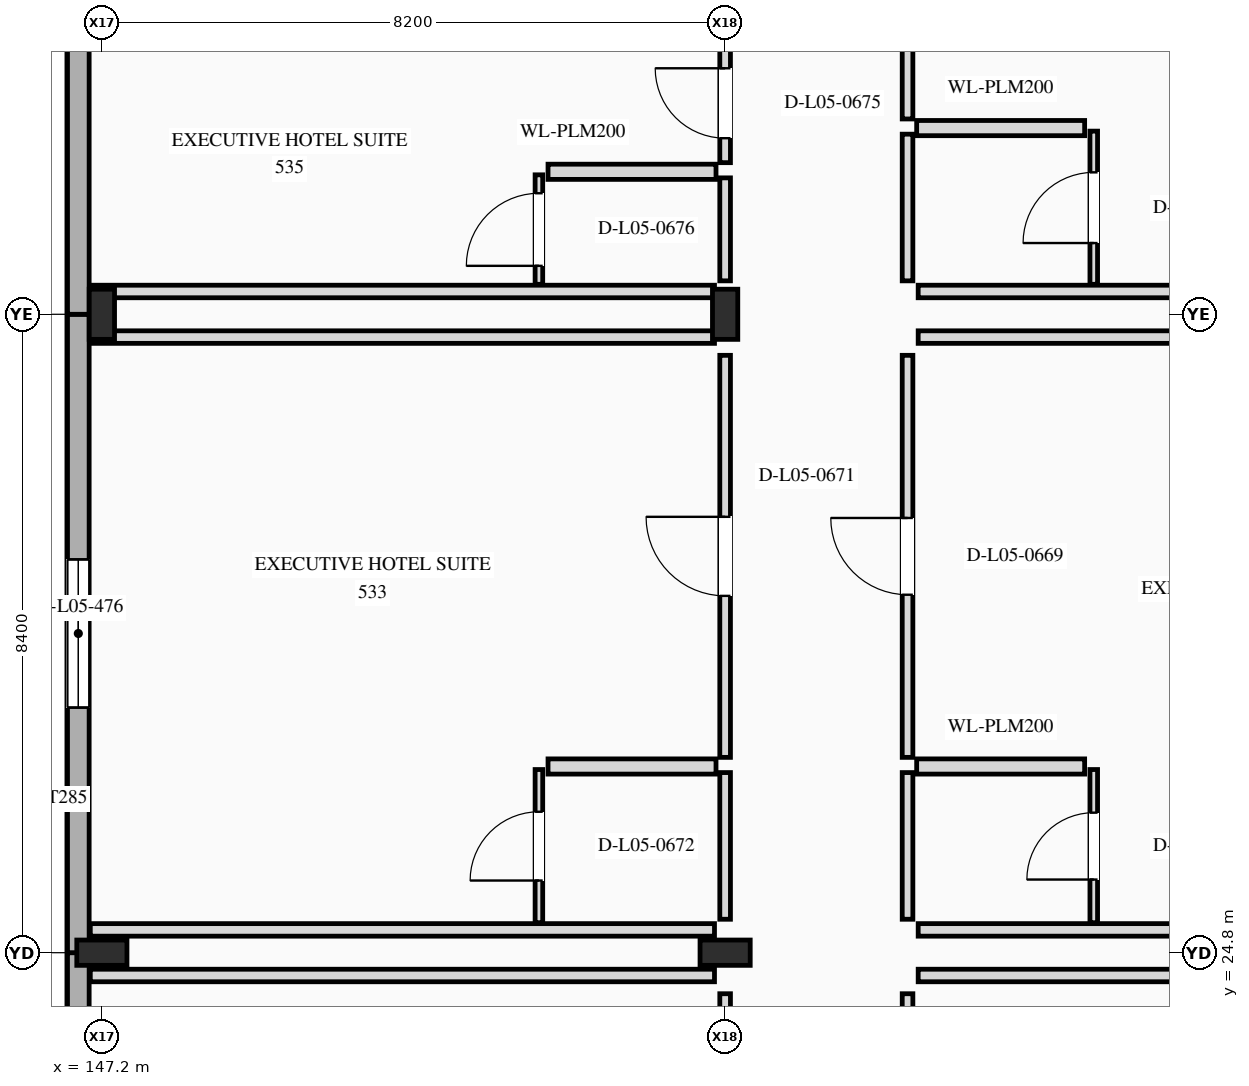
"""IFC4 building model, lengths in metres.
Left out: names, types, materials, properties, quantities, classifications, styles, units other than length and angle.
Written with IfcOpenShell. Run it as: python <this file> out.ifc"""

import sys

from ifc_helpers import new_model, si_unit, direction, frame, frame_2d, origin, origin_2d, place, context, subcontext, project, spatial, rectangle, i_section, extrude, element, fill, save


model = new_model("IFC4")
c1 = context("Model", 3, precision=1e-05, world=origin(), true_north=direction((0.0, 1.0)))
c2 = subcontext(c1, "Body", "Model", "MODEL_VIEW")
j1 = project(units=[si_unit("LENGTHUNIT", "METRE"), si_unit("PLANEANGLEUNIT", "RADIAN")], contexts=[c1])
p1 = place(None, origin())
s1 = spatial("IfcSite", under=j1, at=p1, CompositionType="ELEMENT")
p2 = place(p1, origin())
s2 = spatial("IfcBuilding", under=s1, at=p2, CompositionType="ELEMENT")
p3 = place(p2, frame((0.0, 0.0, 23.4)))
s3 = spatial("IfcBuildingStorey", under=s2, at=p3, CompositionType="ELEMENT", Elevation=23.4)
for number, where, z_axis, x_axis in (
    (1, (147.2, 24.8, 0.0), (0.0, 0.0, 1.0), (0.0, 1.0, 0.0)),
    (2, (147.2, 33.2, 0.0), (0.0, 0.0, 1.0), (1.0, 0.0, 0.0)),
    (3, (155.4, 24.8, 0.0), (0.0, 0.0, 1.0), (0.0, 1.0, 0.0)),
    (4, (155.4, 33.2, 0.0), (0.0, 0.0, 1.0), (1.0, 0.0, 0.0)),
):
    element("IfcColumn", number, at=place(p3, frame(where, z_axis=z_axis, x_axis=x_axis)), inside=s3, PredefinedType="COLUMN", context=c2, shape_type="SweptSolid", body=[
        extrude(i_section(OverallWidth=0.333, OverallDepth=0.66, WebThickness=0.024, FlangeThickness=0.044, at=origin_2d()), origin(), (0.0, 0.0, 1.0), 3.6),
    ])
p4 = place(p3, frame((146.89, 19.254, 0.0), z_axis=(0.0, 0.0, 1.0), x_axis=(0.0, 1.0, 0.0)))
e5 = element("IfcWall", 5, at=p4, inside=s3, PredefinedType="STANDARD", context=c2, shape_type="SweptSolid", body=[
    extrude(rectangle(XDim=5.546, YDim=0.285, at=frame_2d((2.773, 0.0))), origin(), (0.0, 0.0, 1.0), 3.6),
])
p5 = place(p4, frame((1.698, 0.0, 0.85)))
e6 = element("IfcOpeningElement", 6, at=p5, cuts=e5, PredefinedType="OPENING", context=c2, shape_type="SweptSolid", body=[
    extrude(rectangle(XDim=1.8, YDim=1.8, at=frame_2d((0.9, 0.9))), frame((0.0, 0.152, 0.0), z_axis=(0.0, -1.0, 0.0), x_axis=(1.0, 0.0, 0.0)), (0.0, 0.0, 1.0), 0.305),
])
p6 = place(p3, frame((146.89, 24.8, 0.0), z_axis=(0.0, 0.0, 1.0), x_axis=(0.0, 1.0, 0.0)))
e7 = element("IfcWall", 7, at=p6, inside=s3, PredefinedType="STANDARD", context=c2, shape_type="SweptSolid", body=[
    extrude(rectangle(XDim=8.4, YDim=0.285, at=frame_2d((4.2, 0.0))), origin(), (0.0, 0.0, 1.0), 3.6),
])
p7 = place(p6, frame((3.225, 0.0, 0.85)))
e8 = element("IfcOpeningElement", 8, at=p7, cuts=e7, PredefinedType="OPENING", context=c2, shape_type="SweptSolid", body=[
    extrude(rectangle(XDim=1.95, YDim=1.85, at=frame_2d((0.975, 0.925))), frame((0.0, 0.152, 0.0), z_axis=(0.0, -1.0, 0.0), x_axis=(1.0, 0.0, 0.0)), (0.0, 0.0, 1.0), 0.305),
])
p8 = place(p3, frame((146.89, 33.2, 0.0), z_axis=(0.0, 0.0, 1.0), x_axis=(0.0, 1.0, 0.0)))
e9 = element("IfcWall", 9, at=p8, inside=s3, PredefinedType="STANDARD", context=c2, shape_type="SweptSolid", body=[
    extrude(rectangle(XDim=8.4, YDim=0.285, at=frame_2d((4.2, 0.0))), origin(), (0.0, 0.0, 1.0), 3.6),
])
p9 = place(p3, frame((157.8, 21.37, 0.0), z_axis=(0.0, 0.0, 1.0), x_axis=(0.0, 1.0, 0.0)))
e10 = element("IfcWall", 10, at=p9, inside=s3, PredefinedType="PARTITIONING", context=c2, shape_type="SweptSolid", body=[
    extrude(rectangle(XDim=2.89, YDim=0.14, at=frame_2d((1.445, 0.0))), origin(), (0.0, 0.0, 1.0), 2.858),
])
p10 = place(p9, frame((0.97, 0.0, 0.0)))
e11 = element("IfcOpeningElement", 11, at=p10, cuts=e10, PredefinedType="OPENING", context=c2, shape_type="SweptSolid", body=[
    extrude(rectangle(XDim=0.95, YDim=2.15, at=frame_2d((0.475, 1.075))), frame((0.0, 0.08, 0.0), z_axis=(0.0, -1.0, 0.0), x_axis=(1.0, 0.0, 0.0)), (0.0, 0.0, 1.0), 0.16),
])
p11 = place(p3, frame((157.94, 24.5, 0.0), z_axis=(0.0, 0.0, 1.0), x_axis=(1.0, 0.0, 0.0)))
e12 = element("IfcWall", 12, at=p11, inside=s3, PredefinedType="PARTITIONING", context=c2, shape_type="SweptSolid", body=[
    extrude(rectangle(XDim=8.213, YDim=0.165, at=frame_2d((4.106, 0.0))), origin(), (0.0, 0.0, 1.0), 2.69),
])
p12 = place(p3, frame((155.4, 21.37, 0.0), z_axis=(0.0, 0.0, 1.0), x_axis=(0.0, 1.0, 0.0)))
e13 = element("IfcWall", 13, at=p12, inside=s3, PredefinedType="PARTITIONING", context=c2, shape_type="SweptSolid", body=[
    extrude(rectangle(XDim=2.89, YDim=0.14, at=frame_2d((1.445, 0.0))), origin(), (0.0, 0.0, 1.0), 2.774),
])
p13 = place(p12, frame((0.955, 0.0, 0.0)))
e14 = element("IfcOpeningElement", 14, at=p13, cuts=e13, PredefinedType="OPENING", context=c2, shape_type="SweptSolid", body=[
    extrude(rectangle(XDim=0.98, YDim=2.2, at=frame_2d((0.49, 1.1))), frame((0.0, 0.08, 0.0), z_axis=(0.0, -1.0, 0.0), x_axis=(1.0, 0.0, 0.0)), (0.0, 0.0, 1.0), 0.16),
])
p14 = place(p3, frame((147.048, 24.5, 0.0), z_axis=(0.0, 0.0, 1.0), x_axis=(1.0, 0.0, 0.0)))
e15 = element("IfcWall", 15, at=p14, inside=s3, PredefinedType="PARTITIONING", context=c2, shape_type="SweptSolid", body=[
    extrude(rectangle(XDim=8.212, YDim=0.165, at=frame_2d((4.106, 0.0))), origin(), (0.0, 0.0, 1.0), 2.713),
])
p15 = place(p3, frame((157.8, 25.24, 0.0), z_axis=(0.0, 0.0, 1.0), x_axis=(0.0, 1.0, 0.0)))
e16 = element("IfcWall", 16, at=p15, inside=s3, PredefinedType="PARTITIONING", context=c2, shape_type="SweptSolid", body=[
    extrude(rectangle(XDim=1.93, YDim=0.14, at=frame_2d((0.965, 0.0))), origin(), (0.0, 0.0, 1.0), 2.853),
])
p16 = place(p3, frame((157.8, 27.37, 0.0), z_axis=(0.0, 0.0, 1.0), x_axis=(0.0, 1.0, 0.0)))
e17 = element("IfcWall", 17, at=p16, inside=s3, PredefinedType="PARTITIONING", context=c2, shape_type="SweptSolid", body=[
    extrude(rectangle(XDim=5.29, YDim=0.14, at=frame_2d((2.645, 0.0))), origin(), (0.0, 0.0, 1.0), 2.853),
])
p17 = place(p16, frame((2.14, 0.0, 0.0)))
e18 = element("IfcOpeningElement", 18, at=p17, cuts=e17, PredefinedType="OPENING", context=c2, shape_type="SweptSolid", body=[
    extrude(rectangle(XDim=1.01, YDim=2.2, at=frame_2d((0.505, 1.1))), frame((0.0, 0.08, 0.0), z_axis=(0.0, -1.0, 0.0), x_axis=(1.0, 0.0, 0.0)), (0.0, 0.0, 1.0), 0.16),
])
for number, where, z_axis, x_axis in (
    (19, (157.94, 25.1, 0.0), (0.0, 0.0, 1.0), (1.0, 0.0, 0.0)),
    (20, (157.94, 32.9, 0.0), (0.0, 0.0, 1.0), (1.0, 0.0, 0.0)),
):
    element("IfcWall", number, at=place(p3, frame(where, z_axis=z_axis, x_axis=x_axis)), inside=s3, PredefinedType="PARTITIONING", context=c2, shape_type="SweptSolid", body=[
        extrude(rectangle(XDim=8.213, YDim=0.165, at=frame_2d((4.106, 0.0))), origin(), (0.0, 0.0, 1.0), 2.69),
    ])
p18 = place(p3, frame((157.92, 27.25, 0.0), z_axis=(0.0, 0.0, 1.0), x_axis=(1.0, 0.0, 0.0)))
e21 = element("IfcWall", 21, at=p18, inside=s3, PredefinedType="PLUMBINGWALL", context=c2, shape_type="SweptSolid", body=[
    extrude(rectangle(XDim=2.21, YDim=0.2, at=frame_2d((1.105, 0.0))), origin(), (0.0, 0.0, 1.0), 3.3),
])
p19 = place(p3, frame((160.25, 25.195, 0.0), z_axis=(0.0, 0.0, 1.0), x_axis=(0.0, 1.0, 0.0)))
e22 = element("IfcWall", 22, at=p19, inside=s3, PredefinedType="PARTITIONING", context=c2, shape_type="SweptSolid", body=[
    extrude(rectangle(XDim=2.015, YDim=0.1, at=frame_2d((1.008, 0.0))), origin(), (0.0, 0.0, 1.0), 2.853),
])
p20 = place(p19, frame((0.568, 0.0, 0.0)))
e23 = element("IfcOpeningElement", 23, at=p20, cuts=e22, PredefinedType="OPENING", context=c2, shape_type="SweptSolid", body=[
    extrude(rectangle(XDim=0.88, YDim=2.18, at=frame_2d((0.44, 1.09))), frame((0.0, 0.06, 0.0), z_axis=(0.0, -1.0, 0.0), x_axis=(1.0, 0.0, 0.0)), (0.0, 0.0, 1.0), 0.12),
])
p21 = place(p3, frame((155.4, 25.24, 0.0), z_axis=(0.0, 0.0, 1.0), x_axis=(0.0, 1.0, 0.0)))
e24 = element("IfcWall", 24, at=p21, inside=s3, PredefinedType="PARTITIONING", context=c2, shape_type="SweptSolid", body=[
    extrude(rectangle(XDim=1.93, YDim=0.14, at=frame_2d((0.965, 0.0))), origin(), (0.0, 0.0, 1.0), 2.774),
])
p22 = place(p3, frame((155.4, 27.37, 0.0), z_axis=(0.0, 0.0, 1.0), x_axis=(0.0, 1.0, 0.0)))
e25 = element("IfcWall", 25, at=p22, inside=s3, PredefinedType="PARTITIONING", context=c2, shape_type="SweptSolid", body=[
    extrude(rectangle(XDim=5.29, YDim=0.14, at=frame_2d((2.645, 0.0))), origin(), (0.0, 0.0, 1.0), 2.774),
])
p23 = place(p22, frame((2.125, 0.0, 0.0)))
e26 = element("IfcOpeningElement", 26, at=p23, cuts=e25, PredefinedType="OPENING", context=c2, shape_type="SweptSolid", body=[
    extrude(rectangle(XDim=1.04, YDim=2.25, at=frame_2d((0.52, 1.125))), frame((0.0, 0.08, 0.0), z_axis=(0.0, -1.0, 0.0), x_axis=(1.0, 0.0, 0.0)), (0.0, 0.0, 1.0), 0.16),
])
for number, where, z_axis, x_axis in (
    (27, (147.048, 25.1, 0.0), (0.0, 0.0, 1.0), (1.0, 0.0, 0.0)),
    (28, (147.048, 32.9, 0.0), (0.0, 0.0, 1.0), (1.0, 0.0, 0.0)),
):
    element("IfcWall", number, at=place(p3, frame(where, z_axis=z_axis, x_axis=x_axis)), inside=s3, PredefinedType="PARTITIONING", context=c2, shape_type="SweptSolid", body=[
        extrude(rectangle(XDim=8.212, YDim=0.165, at=frame_2d((4.106, 0.0))), origin(), (0.0, 0.0, 1.0), 2.713),
    ])
p24 = place(p3, frame((153.07, 27.25, 0.0), z_axis=(0.0, 0.0, 1.0), x_axis=(1.0, 0.0, 0.0)))
e29 = element("IfcWall", 29, at=p24, inside=s3, PredefinedType="PLUMBINGWALL", context=c2, shape_type="SweptSolid", body=[
    extrude(rectangle(XDim=2.21, YDim=0.2, at=frame_2d((1.105, 0.0))), origin(), (0.0, 0.0, 1.0), 3.3),
])
p25 = place(p3, frame((152.95, 25.195, 0.0), z_axis=(0.0, 0.0, 1.0), x_axis=(0.0, 1.0, 0.0)))
e30 = element("IfcWall", 30, at=p25, inside=s3, PredefinedType="PARTITIONING", context=c2, shape_type="SweptSolid", body=[
    extrude(rectangle(XDim=2.015, YDim=0.1, at=frame_2d((1.008, 0.0))), origin(), (0.0, 0.0, 1.0), 2.908),
])
p26 = place(p25, frame((0.555, 0.0, 0.0)))
e31 = element("IfcOpeningElement", 31, at=p26, cuts=e30, PredefinedType="OPENING", context=c2, shape_type="SweptSolid", body=[
    extrude(rectangle(XDim=0.905, YDim=2.18, at=frame_2d((0.453, 1.09))), frame((0.0, 0.06, 0.0), z_axis=(0.0, -1.0, 0.0), x_axis=(1.0, 0.0, 0.0)), (0.0, 0.0, 1.0), 0.12),
])
p27 = place(p3, frame((157.8, 33.64, 0.0), z_axis=(0.0, 0.0, 1.0), x_axis=(0.0, 1.0, 0.0)))
e32 = element("IfcWall", 32, at=p27, inside=s3, PredefinedType="PARTITIONING", context=c2, shape_type="SweptSolid", body=[
    extrude(rectangle(XDim=1.93, YDim=0.14, at=frame_2d((0.965, 0.0))), origin(), (0.0, 0.0, 1.0), 3.3),
])
p28 = place(p3, frame((157.8, 35.77, 0.0), z_axis=(0.0, 0.0, 1.0), x_axis=(0.0, 1.0, 0.0)))
e33 = element("IfcWall", 33, at=p28, inside=s3, PredefinedType="PARTITIONING", context=c2, shape_type="SweptSolid", body=[
    extrude(rectangle(XDim=5.29, YDim=0.14, at=frame_2d((2.645, 0.0))), origin(), (0.0, 0.0, 1.0), 3.3),
])
p29 = place(p28, frame((2.11, 0.0, 0.0)))
e34 = element("IfcOpeningElement", 34, at=p29, cuts=e33, PredefinedType="OPENING", context=c2, shape_type="SweptSolid", body=[
    extrude(rectangle(XDim=1.07, YDim=2.25, at=frame_2d((0.535, 1.125))), frame((0.0, 0.08, 0.0), z_axis=(0.0, -1.0, 0.0), x_axis=(1.0, 0.0, 0.0)), (0.0, 0.0, 1.0), 0.16),
])
p30 = place(p3, frame((157.94, 33.5, 0.0), z_axis=(0.0, 0.0, 1.0), x_axis=(1.0, 0.0, 0.0)))
e35 = element("IfcWall", 35, at=p30, inside=s3, PredefinedType="PARTITIONING", context=c2, shape_type="SweptSolid", body=[
    extrude(rectangle(XDim=8.213, YDim=0.165, at=frame_2d((4.106, 0.0))), origin(), (0.0, 0.0, 1.0), 2.69),
])
p31 = place(p3, frame((157.92, 35.65, 0.0), z_axis=(0.0, 0.0, 1.0), x_axis=(1.0, 0.0, 0.0)))
e36 = element("IfcWall", 36, at=p31, inside=s3, PredefinedType="PLUMBINGWALL", context=c2, shape_type="SweptSolid", body=[
    extrude(rectangle(XDim=2.21, YDim=0.2, at=frame_2d((1.105, 0.0))), origin(), (0.0, 0.0, 1.0), 3.3),
])
p32 = place(p3, frame((160.25, 33.594, 0.0), z_axis=(0.0, 0.0, 1.0), x_axis=(0.0, 1.0, 0.0)))
e37 = element("IfcWall", 37, at=p32, inside=s3, PredefinedType="PARTITIONING", context=c2, shape_type="SweptSolid", body=[
    extrude(rectangle(XDim=2.016, YDim=0.1, at=frame_2d((1.008, 0.0))), origin(), (0.0, 0.0, 1.0), 3.3),
])
p33 = place(p32, frame((0.543, 0.0, 0.0)))
e38 = element("IfcOpeningElement", 38, at=p33, cuts=e37, PredefinedType="OPENING", context=c2, shape_type="SweptSolid", body=[
    extrude(rectangle(XDim=0.93, YDim=2.22, at=frame_2d((0.465, 1.11))), frame((0.0, 0.06, 0.0), z_axis=(0.0, -1.0, 0.0), x_axis=(1.0, 0.0, 0.0)), (0.0, 0.0, 1.0), 0.12),
])
p34 = place(p3, frame((155.4, 33.64, 0.0), z_axis=(0.0, 0.0, 1.0), x_axis=(0.0, 1.0, 0.0)))
e39 = element("IfcWall", 39, at=p34, inside=s3, PredefinedType="PARTITIONING", context=c2, shape_type="SweptSolid", body=[
    extrude(rectangle(XDim=1.355, YDim=0.14, at=frame_2d((0.678, 0.0))), origin(), (0.0, 0.0, 1.0), 2.69),
])
p35 = place(p3, frame((155.4, 35.195, 0.0), z_axis=(0.0, 0.0, 1.0), x_axis=(0.0, 1.0, 0.0)))
e40 = element("IfcWall", 40, at=p35, inside=s3, PredefinedType="PARTITIONING", context=c2, shape_type="SweptSolid", body=[
    extrude(rectangle(XDim=1.565, YDim=0.14, at=frame_2d((0.782, 0.0))), origin(), (0.0, 0.0, 1.0), 2.69),
])
p36 = place(p35, frame((0.322, 0.0, 0.0)))
e41 = element("IfcOpeningElement", 41, at=p36, cuts=e40, PredefinedType="OPENING", context=c2, shape_type="SweptSolid", body=[
    extrude(rectangle(XDim=0.92, YDim=2.3, at=frame_2d((0.46, 1.15))), frame((0.0, 0.08, 0.0), z_axis=(0.0, -1.0, 0.0), x_axis=(1.0, 0.0, 0.0)), (0.0, 0.0, 1.0), 0.16),
])
p37 = place(p3, frame((147.048, 33.5, 0.0), z_axis=(0.0, 0.0, 1.0), x_axis=(1.0, 0.0, 0.0)))
e42 = element("IfcWall", 42, at=p37, inside=s3, PredefinedType="PARTITIONING", context=c2, shape_type="SweptSolid", body=[
    extrude(rectangle(XDim=8.212, YDim=0.165, at=frame_2d((4.106, 0.0))), origin(), (0.0, 0.0, 1.0), 2.713),
])
p38 = place(p3, frame((153.07, 35.075, 0.0), z_axis=(0.0, 0.0, 1.0), x_axis=(1.0, 0.0, 0.0)))
e43 = element("IfcWall", 43, at=p38, inside=s3, PredefinedType="PLUMBINGWALL", context=c2, shape_type="SweptSolid", body=[
    extrude(rectangle(XDim=2.21, YDim=0.2, at=frame_2d((1.105, 0.0))), origin(), (0.0, 0.0, 1.0), 3.3),
])
p39 = place(p3, frame((152.95, 33.594, 0.0), z_axis=(0.0, 0.0, 1.0), x_axis=(0.0, 1.0, 0.0)))
e44 = element("IfcWall", 44, at=p39, inside=s3, PredefinedType="PARTITIONING", context=c2, shape_type="SweptSolid", body=[
    extrude(rectangle(XDim=1.44, YDim=0.1, at=frame_2d((0.72, 0.0))), origin(), (0.0, 0.0, 1.0), 3.3),
])
p40 = place(p39, frame((0.243, 0.0, 0.0)))
e45 = element("IfcOpeningElement", 45, at=p40, cuts=e44, PredefinedType="OPENING", context=c2, shape_type="SweptSolid", body=[
    extrude(rectangle(XDim=0.955, YDim=2.22, at=frame_2d((0.478, 1.11))), frame((0.0, 0.06, 0.0), z_axis=(0.0, -1.0, 0.0), x_axis=(1.0, 0.0, 0.0)), (0.0, 0.0, 1.0), 0.12),
])
p41 = place(p7, origin())
e46 = element("IfcWindow", 46, at=p41, inside=s3, PartitioningType="SINGLE_PANEL", PredefinedType="WINDOW", context=c2, shape_type="SweptSolid", body=[
    extrude(rectangle(XDim=1.95, YDim=1.85, at=frame_2d((0.975, 0.925))), frame((0.0, 0.03, 0.0), z_axis=(0.0, -1.0, 0.0), x_axis=(1.0, 0.0, 0.0)), (0.0, 0.0, 1.0), 0.06),
])
fill(e8, e46)
p42 = place(p17, origin())
e47 = element("IfcDoor", 47, at=p42, inside=s3, OperationType="SINGLE_SWING_RIGHT", PredefinedType="DOOR", context=c2, shape_type="SweptSolid", body=[
    extrude(rectangle(XDim=1.01, YDim=2.2, at=frame_2d((0.505, 1.1))), frame((0.0, 0.025, 0.0), z_axis=(0.0, -1.0, 0.0), x_axis=(1.0, 0.0, 0.0)), (0.0, 0.0, 1.0), 0.05),
])
fill(e18, e47)
p43 = place(p20, origin())
e48 = element("IfcDoor", 48, at=p43, inside=s3, OperationType="SINGLE_SWING_LEFT", PredefinedType="DOOR", context=c2, shape_type="SweptSolid", body=[
    extrude(rectangle(XDim=0.88, YDim=2.18, at=frame_2d((0.44, 1.09))), frame((0.0, 0.025, 0.0), z_axis=(0.0, -1.0, 0.0), x_axis=(1.0, 0.0, 0.0)), (0.0, 0.0, 1.0), 0.05),
])
fill(e23, e48)
p44 = place(p23, origin())
e49 = element("IfcDoor", 49, at=p44, inside=s3, OperationType="SINGLE_SWING_RIGHT", PredefinedType="DOOR", context=c2, shape_type="SweptSolid", body=[
    extrude(rectangle(XDim=1.04, YDim=2.25, at=frame_2d((0.52, 1.125))), frame((0.0, 0.025, 0.0), z_axis=(0.0, -1.0, 0.0), x_axis=(1.0, 0.0, 0.0)), (0.0, 0.0, 1.0), 0.05),
])
fill(e26, e49)
p45 = place(p26, origin())
e50 = element("IfcDoor", 50, at=p45, inside=s3, OperationType="SINGLE_SWING_LEFT", PredefinedType="DOOR", context=c2, shape_type="SweptSolid", body=[
    extrude(rectangle(XDim=0.905, YDim=2.18, at=frame_2d((0.453, 1.09))), frame((0.0, 0.025, 0.0), z_axis=(0.0, -1.0, 0.0), x_axis=(1.0, 0.0, 0.0)), (0.0, 0.0, 1.0), 0.05),
])
fill(e31, e50)
p46 = place(p33, origin())
e51 = element("IfcDoor", 51, at=p46, inside=s3, OperationType="SINGLE_SWING_LEFT", PredefinedType="DOOR", context=c2, shape_type="SweptSolid", body=[
    extrude(rectangle(XDim=0.93, YDim=2.22, at=frame_2d((0.465, 1.11))), frame((0.0, 0.025, 0.0), z_axis=(0.0, -1.0, 0.0), x_axis=(1.0, 0.0, 0.0)), (0.0, 0.0, 1.0), 0.05),
])
fill(e38, e51)
p47 = place(p36, origin())
e52 = element("IfcDoor", 52, at=p47, inside=s3, OperationType="SINGLE_SWING_RIGHT", PredefinedType="DOOR", context=c2, shape_type="SweptSolid", body=[
    extrude(rectangle(XDim=0.92, YDim=2.3, at=frame_2d((0.46, 1.15))), frame((0.0, 0.025, 0.0), z_axis=(0.0, -1.0, 0.0), x_axis=(1.0, 0.0, 0.0)), (0.0, 0.0, 1.0), 0.05),
])
fill(e41, e52)
p48 = place(p40, origin())
e53 = element("IfcDoor", 53, at=p48, inside=s3, OperationType="SINGLE_SWING_LEFT", PredefinedType="DOOR", context=c2, shape_type="SweptSolid", body=[
    extrude(rectangle(XDim=0.955, YDim=2.22, at=frame_2d((0.478, 1.11))), frame((0.0, 0.025, 0.0), z_axis=(0.0, -1.0, 0.0), x_axis=(1.0, 0.0, 0.0)), (0.0, 0.0, 1.0), 0.05),
])
fill(e45, e53)
save(model, sys.argv[1])
